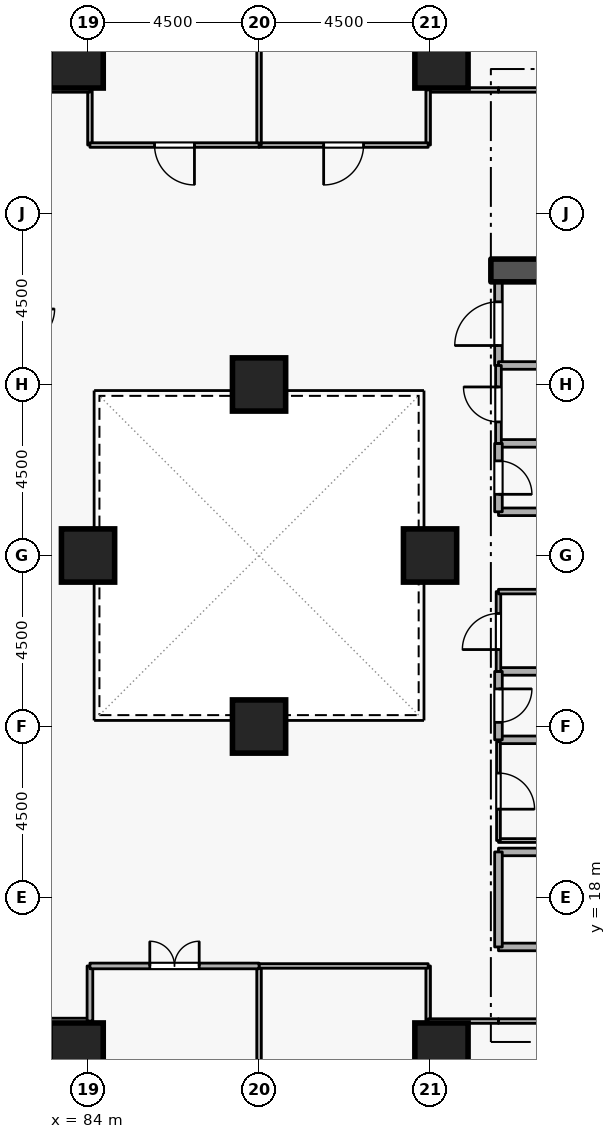
"""IFC4 building model, lengths in metres.
Left out: names, types, materials, properties, quantities, classifications, styles, units other than length and angle.
Written with IfcOpenShell. Run it as: python <this file> out.ifc"""

import sys

from ifc_helpers import new_model, si_unit, direction, frame, frame_2d, origin, origin_2d, place, context, subcontext, project, spatial, rectangle, extrude, element, fill, save


model = new_model("IFC4")
c1 = context("Model", 3, precision=1e-05, world=origin(), true_north=direction((0.0, 1.0)))
c2 = subcontext(c1, "Body", "Model", "MODEL_VIEW")
j1 = project(units=[si_unit("LENGTHUNIT", "METRE"), si_unit("PLANEANGLEUNIT", "RADIAN")], contexts=[c1])
p1 = place(None, origin())
s1 = spatial("IfcSite", under=j1, at=p1, CompositionType="ELEMENT")
p2 = place(p1, origin())
s2 = spatial("IfcBuilding", under=s1, at=p2, CompositionType="ELEMENT")
p3 = place(p2, frame((0.0, 0.0, 57.3)))
s3 = spatial("IfcBuildingStorey", under=s2, at=p3, CompositionType="ELEMENT", Elevation=57.3)
p4 = place(p3, frame((94.6, 34.5, 0.0), z_axis=(0.0, 0.0, 1.0), x_axis=(1.0, 0.0, 0.0)))
e1 = element("IfcWall", 1, at=p4, inside=s3, PredefinedType="SHEAR", context=c2, shape_type="SweptSolid", body=[
    extrude(rectangle(XDim=5.7, YDim=0.6, at=frame_2d((2.85, 0.0))), origin(), (0.0, 0.0, 1.0), 3.6),
])
for number, where, z_axis, x_axis in (
    (2, (93.3, 14.0, 0.0), (0.0, 0.0, 1.0), (1.0, 0.0, 0.0)),
    (3, (93.3, 40.0, 0.0), (0.0, 0.0, 1.0), (1.0, 0.0, 0.0)),
    (4, (83.7, 14.0, 0.0), (0.0, 0.0, 1.0), (1.0, 0.0, 0.0)),
    (5, (83.7, 40.0, 0.0), (0.0, 0.0, 1.0), (1.0, 0.0, 0.0)),
    (6, (93.0, 27.0, 0.0), (0.0, 0.0, 1.0), (1.0, 0.0, 0.0)),
    (7, (84.0, 27.0, 0.0), (0.0, 0.0, 1.0), (1.0, 0.0, 0.0)),
    (8, (88.5, 22.5, 0.0), (0.0, 0.0, 1.0), (1.0, 0.0, 0.0)),
    (9, (88.5, 31.5, 0.0), (0.0, 0.0, 1.0), (1.0, 0.0, 0.0)),
):
    element("IfcColumn", number, at=place(p3, frame(where, z_axis=z_axis, x_axis=x_axis)), inside=s3, PredefinedType="COLUMN", context=c2, shape_type="SweptSolid", body=[
        extrude(rectangle(XDim=1.4, YDim=1.4, at=origin_2d()), origin(), (0.0, 0.0, 1.0), 3.6),
    ])
p5 = place(p3, frame((94.8, 16.7, 0.0), z_axis=(0.0, 0.0, 1.0), x_axis=(1.0, 0.0, 0.0)))
e10 = element("IfcWall", 10, at=p5, inside=s3, PredefinedType="STANDARD", context=c2, shape_type="SweptSolid", body=[
    extrude(rectangle(XDim=5.7, YDim=0.2, at=frame_2d((2.85, 0.0))), origin(), (0.0, 0.0, 1.0), 3.34),
])
p6 = place(p5, frame((2.275, 0.0, 0.0)))
e11 = element("IfcOpeningElement", 11, at=p6, cuts=e10, PredefinedType="OPENING", context=c2, shape_type="SweptSolid", body=[
    extrude(rectangle(XDim=1.15, YDim=2.1, at=frame_2d((0.575, 1.05))), frame((0.0, 0.11, 0.0), z_axis=(0.0, -1.0, 0.0), x_axis=(1.0, 0.0, 0.0)), (0.0, 0.0, 1.0), 0.22),
])
p7 = place(p3, frame((97.1, 19.2, 0.0), z_axis=(0.0, 0.0, 1.0), x_axis=(-1.0, 0.0, 0.0)))
e12 = element("IfcWall", 12, at=p7, inside=s3, PredefinedType="STANDARD", context=c2, shape_type="SweptSolid", body=[
    extrude(rectangle(XDim=2.3, YDim=0.2, at=frame_2d((1.15, 0.0))), origin(), (0.0, 0.0, 1.0), 2.545),
])
p8 = place(p3, frame((94.8, 19.2, 0.0), z_axis=(0.0, 0.0, 1.0), x_axis=(0.0, -1.0, 0.0)))
e13 = element("IfcWall", 13, at=p8, inside=s3, PredefinedType="STANDARD", context=c2, shape_type="SweptSolid", body=[
    extrude(rectangle(XDim=2.5, YDim=0.2, at=frame_2d((1.25, 0.0))), origin(), (0.0, 0.0, 1.0), 3.34),
])
for number, where, z_axis, x_axis in (
    (14, (94.8, 28.15, 0.0), (0.0, 0.0, 1.0), (1.0, 0.0, 0.0)),
    (15, (96.85, 29.95, 0.0), (0.0, 0.0, 1.0), (-1.0, 0.0, 0.0)),
):
    element("IfcWall", number, at=place(p3, frame(where, z_axis=z_axis, x_axis=x_axis)), inside=s3, PredefinedType="STANDARD", context=c2, shape_type="SweptSolid", body=[
        extrude(rectangle(XDim=2.05, YDim=0.2, at=frame_2d((1.025, 0.0))), origin(), (0.0, 0.0, 1.0), 3.34),
    ])
p9 = place(p3, frame((94.8, 29.95, 0.0), z_axis=(0.0, 0.0, 1.0), x_axis=(0.0, -1.0, 0.0)))
e16 = element("IfcWall", 16, at=p9, inside=s3, PredefinedType="STANDARD", context=c2, shape_type="SweptSolid", body=[
    extrude(rectangle(XDim=1.8, YDim=0.2, at=frame_2d((0.9, 0.0))), origin(), (0.0, 0.0, 1.0), 3.34),
])
p10 = place(p9, frame((0.46, 0.0, 0.0)))
e17 = element("IfcOpeningElement", 17, at=p10, cuts=e16, PredefinedType="OPENING", context=c2, shape_type="SweptSolid", body=[
    extrude(rectangle(XDim=0.88, YDim=2.04, at=frame_2d((0.44, 1.02))), frame((0.0, 0.11, 0.0), z_axis=(0.0, -1.0, 0.0), x_axis=(1.0, 0.0, 0.0)), (0.0, 0.0, 1.0), 0.22),
])
for number, where, z_axis, x_axis in (
    (18, (94.8, 22.15, 0.0), (0.0, 0.0, 1.0), (1.0, 0.0, 0.0)),
    (19, (96.85, 23.95, 0.0), (0.0, 0.0, 1.0), (-1.0, 0.0, 0.0)),
):
    element("IfcWall", number, at=place(p3, frame(where, z_axis=z_axis, x_axis=x_axis)), inside=s3, PredefinedType="STANDARD", context=c2, shape_type="SweptSolid", body=[
        extrude(rectangle(XDim=2.05, YDim=0.2, at=frame_2d((1.025, 0.0))), origin(), (0.0, 0.0, 1.0), 3.34),
    ])
p11 = place(p3, frame((94.8, 23.95, 0.0), z_axis=(0.0, 0.0, 1.0), x_axis=(0.0, -1.0, 0.0)))
e20 = element("IfcWall", 20, at=p11, inside=s3, PredefinedType="STANDARD", context=c2, shape_type="SweptSolid", body=[
    extrude(rectangle(XDim=1.8, YDim=0.2, at=frame_2d((0.9, 0.0))), origin(), (0.0, 0.0, 1.0), 3.34),
])
p12 = place(p11, frame((0.46, 0.0, 0.0)))
e21 = element("IfcOpeningElement", 21, at=p12, cuts=e20, PredefinedType="OPENING", context=c2, shape_type="SweptSolid", body=[
    extrude(rectangle(XDim=0.88, YDim=2.04, at=frame_2d((0.44, 1.02))), frame((0.0, 0.11, 0.0), z_axis=(0.0, -1.0, 0.0), x_axis=(1.0, 0.0, 0.0)), (0.0, 0.0, 1.0), 0.22),
])
p13 = place(p3, frame((94.8, 32.0, 0.0), z_axis=(0.0, 0.0, 1.0), x_axis=(0.0, 1.0, 0.0)))
e22 = element("IfcWall", 22, at=p13, inside=s3, PredefinedType="STANDARD", context=c2, shape_type="SweptSolid", body=[
    extrude(rectangle(XDim=2.2, YDim=0.2, at=frame_2d((1.1, 0.0))), origin(), (0.0, 0.0, 1.0), 3.34),
])
p14 = place(p13, frame((0.525, 0.0, 0.0)))
e23 = element("IfcOpeningElement", 23, at=p14, cuts=e22, PredefinedType="OPENING", context=c2, shape_type="SweptSolid", body=[
    extrude(rectangle(XDim=1.15, YDim=2.1, at=frame_2d((0.575, 1.05))), frame((0.0, 0.11, 0.0), z_axis=(0.0, -1.0, 0.0), x_axis=(1.0, 0.0, 0.0)), (0.0, 0.0, 1.0), 0.22),
])
p15 = place(p3, frame((96.85, 32.0, 0.0), z_axis=(0.0, 0.0, 1.0), x_axis=(-1.0, 0.0, 0.0)))
e24 = element("IfcWall", 24, at=p15, inside=s3, PredefinedType="STANDARD", context=c2, shape_type="SweptSolid", body=[
    extrude(rectangle(XDim=2.05, YDim=0.2, at=frame_2d((1.025, 0.0))), origin(), (0.0, 0.0, 1.0), 3.34),
])
p16 = place(p3, frame((94.8, 19.5, 0.0), z_axis=(0.0, 0.0, 1.0), x_axis=(1.0, 0.0, 0.0)))
e25 = element("IfcWall", 25, at=p16, inside=s3, PredefinedType="PARTITIONING", context=c2, shape_type="SweptSolid", body=[
    extrude(rectangle(XDim=2.05, YDim=0.1, at=frame_2d((1.025, 0.0))), origin(), (0.0, 0.0, 1.0), 2.545),
])
p17 = place(p3, frame((94.8, 22.1, 0.0), z_axis=(0.0, 0.0, 1.0), x_axis=(0.0, -1.0, 0.0)))
e26 = element("IfcWall", 26, at=p17, inside=s3, PredefinedType="PARTITIONING", context=c2, shape_type="SweptSolid", body=[
    extrude(rectangle(XDim=2.6, YDim=0.1, at=frame_2d((1.3, 0.0))), origin(), (0.0, 0.0, 1.0), 3.34),
])
p18 = place(p17, frame((0.825, 0.0, 0.0)))
e27 = element("IfcOpeningElement", 27, at=p18, cuts=e26, PredefinedType="OPENING", context=c2, shape_type="SweptSolid", body=[
    extrude(rectangle(XDim=0.95, YDim=2.1, at=frame_2d((0.475, 1.05))), frame((0.0, 0.06, 0.0), z_axis=(0.0, -1.0, 0.0), x_axis=(1.0, 0.0, 0.0)), (0.0, 0.0, 1.0), 0.12),
])
p19 = place(p3, frame((94.8, 23.95, 0.0), z_axis=(0.0, 0.0, 1.0), x_axis=(0.0, 1.0, 0.0)))
e28 = element("IfcWall", 28, at=p19, inside=s3, PredefinedType="PARTITIONING", context=c2, shape_type="SweptSolid", body=[
    extrude(rectangle(XDim=2.1, YDim=0.12, at=frame_2d((1.05, 0.0))), origin(), (0.0, 0.0, 1.0), 3.34),
])
p20 = place(p19, frame((0.575, 0.0, 0.0)))
e29 = element("IfcOpeningElement", 29, at=p20, cuts=e28, PredefinedType="OPENING", context=c2, shape_type="SweptSolid", body=[
    extrude(rectangle(XDim=0.95, YDim=2.1, at=frame_2d((0.475, 1.05))), frame((0.0, 0.07, 0.0), z_axis=(0.0, -1.0, 0.0), x_axis=(1.0, 0.0, 0.0)), (0.0, 0.0, 1.0), 0.14),
])
p21 = place(p3, frame((94.8, 26.05, 0.0), z_axis=(0.0, 0.0, 1.0), x_axis=(1.0, 0.0, 0.0)))
e30 = element("IfcWall", 30, at=p21, inside=s3, PredefinedType="PARTITIONING", context=c2, shape_type="SweptSolid", body=[
    extrude(rectangle(XDim=2.05, YDim=0.12, at=frame_2d((1.025, 0.0))), origin(), (0.0, 0.0, 1.0), 3.34),
])
p22 = place(p3, frame((94.8, 29.95, 0.0), z_axis=(0.0, 0.0, 1.0), x_axis=(0.0, 1.0, 0.0)))
e31 = element("IfcWall", 31, at=p22, inside=s3, PredefinedType="PARTITIONING", context=c2, shape_type="SweptSolid", body=[
    extrude(rectangle(XDim=2.05, YDim=0.15, at=frame_2d((1.025, 0.0))), origin(), (0.0, 0.0, 1.0), 3.34),
])
p23 = place(p22, frame((0.565, 0.0, 0.0)))
e32 = element("IfcOpeningElement", 32, at=p23, cuts=e31, PredefinedType="OPENING", context=c2, shape_type="SweptSolid", body=[
    extrude(rectangle(XDim=0.92, YDim=2.08, at=frame_2d((0.46, 1.04))), frame((0.0, 0.085, 0.0), z_axis=(0.0, -1.0, 0.0), x_axis=(1.0, 0.0, 0.0)), (0.0, 0.0, 1.0), 0.17),
])
p24 = place(p3, frame((92.95, 16.2, 0.0), z_axis=(0.0, 0.0, 1.0), x_axis=(0.0, -1.0, 0.0)))
e33 = element("IfcWall", 33, at=p24, inside=s3, PredefinedType="PARTITIONING", context=c2, shape_type="SweptSolid", body=[
    extrude(rectangle(XDim=1.45, YDim=0.12, at=frame_2d((0.725, 0.0))), origin(), (0.0, 0.0, 1.0), 3.34),
])
p25 = place(p3, frame((92.95, 14.75, 0.0), z_axis=(0.0, 0.0, 1.0), x_axis=(1.0, 0.0, 0.0)))
e34 = element("IfcWall", 34, at=p25, inside=s3, PredefinedType="PARTITIONING", context=c2, shape_type="SweptSolid", body=[
    extrude(rectangle(XDim=1.85, YDim=0.12, at=frame_2d((0.925, 0.0))), origin(), (0.0, 0.0, 1.0), 3.34),
])
p26 = place(p3, frame((94.8, 14.75, 0.0), z_axis=(0.0, 0.0, 1.0), x_axis=(1.0, 0.0, 0.0)))
e35 = element("IfcWall", 35, at=p26, inside=s3, PredefinedType="PARTITIONING", context=c2, shape_type="SweptSolid", body=[
    extrude(rectangle(XDim=9.35, YDim=0.12, at=frame_2d((4.675, 0.0))), origin(), (0.0, 0.0, 1.0), 3.34),
])
p27 = place(p26, frame((4.15, 0.0, 0.0)))
e36 = element("IfcOpeningElement", 36, at=p27, cuts=e35, PredefinedType="OPENING", context=c2, shape_type="SweptSolid", body=[
    extrude(rectangle(XDim=1.05, YDim=2.1, at=frame_2d((0.525, 1.05))), frame((0.0, 0.07, 0.0), z_axis=(0.0, -1.0, 0.0), x_axis=(1.0, 0.0, 0.0)), (0.0, 0.0, 1.0), 0.14),
])
p28 = place(p3, frame((88.5, 8.78, 0.0), z_axis=(0.0, 0.0, 1.0), x_axis=(0.0, 1.0, 0.0)))
e37 = element("IfcWall", 37, at=p28, inside=s3, PredefinedType="PARTITIONING", context=c2, shape_type="SweptSolid", body=[
    extrude(rectangle(XDim=7.42, YDim=0.12, at=frame_2d((3.71, 0.0))), origin(), (0.0, 0.0, 1.0), 2.932),
])
p29 = place(p3, frame((88.5, 16.2, 0.0), z_axis=(0.0, 0.0, 1.0), x_axis=(1.0, 0.0, 0.0)))
e38 = element("IfcWall", 38, at=p29, inside=s3, PredefinedType="PARTITIONING", context=c2, shape_type="SweptSolid", body=[
    extrude(rectangle(XDim=4.45, YDim=0.12, at=frame_2d((2.225, 0.0))), origin(), (0.0, 0.0, 1.0), 3.34),
])
p30 = place(p3, frame((82.2, 14.75, 0.0), z_axis=(0.0, 0.0, 1.0), x_axis=(1.0, 0.0, 0.0)))
e39 = element("IfcWall", 39, at=p30, inside=s3, PredefinedType="PARTITIONING", context=c2, shape_type="SweptSolid", body=[
    extrude(rectangle(XDim=1.85, YDim=0.15, at=frame_2d((0.925, 0.0))), origin(), (0.0, 0.0, 1.0), 3.34),
])
p31 = place(p3, frame((84.05, 14.75, 0.0), z_axis=(0.0, 0.0, 1.0), x_axis=(0.0, 1.0, 0.0)))
e40 = element("IfcWall", 40, at=p31, inside=s3, PredefinedType="PARTITIONING", context=c2, shape_type="SweptSolid", body=[
    extrude(rectangle(XDim=1.45, YDim=0.15, at=frame_2d((0.725, 0.0))), origin(), (0.0, 0.0, 1.0), 3.34),
])
p32 = place(p3, frame((84.05, 16.2, 0.0), z_axis=(0.0, 0.0, 1.0), x_axis=(1.0, 0.0, 0.0)))
e41 = element("IfcWall", 41, at=p32, inside=s3, PredefinedType="PARTITIONING", context=c2, shape_type="SweptSolid", body=[
    extrude(rectangle(XDim=4.45, YDim=0.15, at=frame_2d((2.225, 0.0))), origin(), (0.0, 0.0, 1.0), 3.34),
])
p33 = place(p32, frame((1.575, 0.0, 0.0)))
e42 = element("IfcOpeningElement", 42, at=p33, cuts=e41, PredefinedType="OPENING", context=c2, shape_type="SweptSolid", body=[
    extrude(rectangle(XDim=1.3, YDim=2.12, at=frame_2d((0.65, 1.06))), frame((0.0, 0.085, 0.0), z_axis=(0.0, -1.0, 0.0), x_axis=(1.0, 0.0, 0.0)), (0.0, 0.0, 1.0), 0.17),
])
p34 = place(p3, frame((97.95, 39.25, 0.0), z_axis=(0.0, 0.0, 1.0), x_axis=(-1.0, 0.0, 0.0)))
e43 = element("IfcWall", 43, at=p34, inside=s3, PredefinedType="PARTITIONING", context=c2, shape_type="SweptSolid", body=[
    extrude(rectangle(XDim=3.15, YDim=0.12, at=frame_2d((1.575, 0.0))), origin(), (0.0, 0.0, 1.0), 3.34),
])
p35 = place(p3, frame((94.8, 39.25, 0.0), z_axis=(0.0, 0.0, 1.0), x_axis=(-1.0, 0.0, 0.0)))
e44 = element("IfcWall", 44, at=p35, inside=s3, PredefinedType="PARTITIONING", context=c2, shape_type="SweptSolid", body=[
    extrude(rectangle(XDim=1.85, YDim=0.12, at=frame_2d((0.925, 0.0))), origin(), (0.0, 0.0, 1.0), 3.34),
])
p36 = place(p3, frame((92.95, 39.25, 0.0), z_axis=(0.0, 0.0, 1.0), x_axis=(0.0, -1.0, 0.0)))
e45 = element("IfcWall", 45, at=p36, inside=s3, PredefinedType="PARTITIONING", context=c2, shape_type="SweptSolid", body=[
    extrude(rectangle(XDim=1.45, YDim=0.12, at=frame_2d((0.725, 0.0))), origin(), (0.0, 0.0, 1.0), 3.34),
])
p37 = place(p3, frame((92.95, 37.8, 0.0), z_axis=(0.0, 0.0, 1.0), x_axis=(-1.0, 0.0, 0.0)))
e46 = element("IfcWall", 46, at=p37, inside=s3, PredefinedType="PARTITIONING", context=c2, shape_type="SweptSolid", body=[
    extrude(rectangle(XDim=4.45, YDim=0.12, at=frame_2d((2.225, 0.0))), origin(), (0.0, 0.0, 1.0), 3.34),
])
p38 = place(p37, frame((1.7, 0.0, 0.0)))
e47 = element("IfcOpeningElement", 47, at=p38, cuts=e46, PredefinedType="OPENING", context=c2, shape_type="SweptSolid", body=[
    extrude(rectangle(XDim=1.05, YDim=2.1, at=frame_2d((0.525, 1.05))), frame((0.0, 0.07, 0.0), z_axis=(0.0, -1.0, 0.0), x_axis=(1.0, 0.0, 0.0)), (0.0, 0.0, 1.0), 0.14),
])
p39 = place(p3, frame((88.5, 37.8, 0.0), z_axis=(0.0, 0.0, 1.0), x_axis=(0.0, 1.0, 0.0)))
e48 = element("IfcWall", 48, at=p39, inside=s3, PredefinedType="PARTITIONING", context=c2, shape_type="SweptSolid", body=[
    extrude(rectangle(XDim=13.42, YDim=0.12, at=frame_2d((6.71, 0.0))), origin(), (0.0, 0.0, 1.0), 2.932),
])
p40 = place(p3, frame((84.05, 37.8, 0.0), z_axis=(0.0, 0.0, 1.0), x_axis=(0.0, 1.0, 0.0)))
e49 = element("IfcWall", 49, at=p40, inside=s3, PredefinedType="PARTITIONING", context=c2, shape_type="SweptSolid", body=[
    extrude(rectangle(XDim=1.45, YDim=0.12, at=frame_2d((0.725, 0.0))), origin(), (0.0, 0.0, 1.0), 3.34),
])
p41 = place(p3, frame((84.05, 39.25, 0.0), z_axis=(0.0, 0.0, 1.0), x_axis=(-1.0, 0.0, 0.0)))
e50 = element("IfcWall", 50, at=p41, inside=s3, PredefinedType="PARTITIONING", context=c2, shape_type="SweptSolid", body=[
    extrude(rectangle(XDim=1.85, YDim=0.12, at=frame_2d((0.925, 0.0))), origin(), (0.0, 0.0, 1.0), 3.34),
])
p42 = place(p3, frame((88.5, 37.8, 0.0), z_axis=(0.0, 0.0, 1.0), x_axis=(-1.0, 0.0, 0.0)))
e51 = element("IfcWall", 51, at=p42, inside=s3, PredefinedType="PARTITIONING", context=c2, shape_type="SweptSolid", body=[
    extrude(rectangle(XDim=4.45, YDim=0.12, at=frame_2d((2.225, 0.0))), origin(), (0.0, 0.0, 1.0), 3.34),
])
p43 = place(p42, frame((1.7, 0.0, 0.0)))
e52 = element("IfcOpeningElement", 52, at=p43, cuts=e51, PredefinedType="OPENING", context=c2, shape_type="SweptSolid", body=[
    extrude(rectangle(XDim=1.05, YDim=2.1, at=frame_2d((0.525, 1.05))), frame((0.0, 0.07, 0.0), z_axis=(0.0, -1.0, 0.0), x_axis=(1.0, 0.0, 0.0)), (0.0, 0.0, 1.0), 0.14),
])
p44 = place(p10, origin())
e53 = element("IfcDoor", 53, at=p44, inside=s3, OperationType="SINGLE_SWING_RIGHT", PredefinedType="DOOR", context=c2, shape_type="SweptSolid", body=[
    extrude(rectangle(XDim=0.88, YDim=2.04, at=frame_2d((0.44, 1.02))), frame((0.0, 0.025, 0.0), z_axis=(0.0, -1.0, 0.0), x_axis=(1.0, 0.0, 0.0)), (0.0, 0.0, 1.0), 0.05),
])
fill(e17, e53)
p45 = place(p12, origin())
e54 = element("IfcDoor", 54, at=p45, inside=s3, OperationType="SINGLE_SWING_LEFT", PredefinedType="DOOR", context=c2, shape_type="SweptSolid", body=[
    extrude(rectangle(XDim=0.88, YDim=2.04, at=frame_2d((0.44, 1.02))), frame((0.0, 0.025, 0.0), z_axis=(0.0, -1.0, 0.0), x_axis=(1.0, 0.0, 0.0)), (0.0, 0.0, 1.0), 0.05),
])
fill(e21, e54)
p46 = place(p18, origin())
e55 = element("IfcDoor", 55, at=p46, inside=s3, OperationType="SINGLE_SWING_RIGHT", PredefinedType="DOOR", context=c2, shape_type="SweptSolid", body=[
    extrude(rectangle(XDim=0.95, YDim=2.1, at=frame_2d((0.475, 1.05))), frame((0.0, 0.025, 0.0), z_axis=(0.0, -1.0, 0.0), x_axis=(1.0, 0.0, 0.0)), (0.0, 0.0, 1.0), 0.05),
])
fill(e27, e55)
p47 = place(p20, origin())
e56 = element("IfcDoor", 56, at=p47, inside=s3, OperationType="SINGLE_SWING_LEFT", PredefinedType="DOOR", context=c2, shape_type="SweptSolid", body=[
    extrude(rectangle(XDim=0.95, YDim=2.1, at=frame_2d((0.475, 1.05))), frame((0.0, 0.025, 0.0), z_axis=(0.0, -1.0, 0.0), x_axis=(1.0, 0.0, 0.0)), (0.0, 0.0, 1.0), 0.05),
])
fill(e29, e56)
p48 = place(p23, origin())
e57 = element("IfcDoor", 57, at=p48, inside=s3, OperationType="SINGLE_SWING_RIGHT", PredefinedType="DOOR", context=c2, shape_type="SweptSolid", body=[
    extrude(rectangle(XDim=0.92, YDim=2.08, at=frame_2d((0.46, 1.04))), frame((0.0, 0.025, 0.0), z_axis=(0.0, -1.0, 0.0), x_axis=(1.0, 0.0, 0.0)), (0.0, 0.0, 1.0), 0.05),
])
fill(e32, e57)
p49 = place(p14, origin())
e58 = element("IfcDoor", 58, at=p49, inside=s3, OperationType="SINGLE_SWING_LEFT", PredefinedType="DOOR", context=c2, shape_type="SweptSolid", body=[
    extrude(rectangle(XDim=1.15, YDim=2.1, at=frame_2d((0.575, 1.05))), frame((0.0, 0.025, 0.0), z_axis=(0.0, -1.0, 0.0), x_axis=(1.0, 0.0, 0.0)), (0.0, 0.0, 1.0), 0.05),
])
fill(e23, e58)
p50 = place(p33, origin())
e59 = element("IfcDoor", 59, at=p50, inside=s3, OperationType="DOUBLE_DOOR_SINGLE_SWING", PredefinedType="DOOR", context=c2, shape_type="SweptSolid", body=[
    extrude(rectangle(XDim=1.3, YDim=2.12, at=frame_2d((0.65, 1.06))), frame((0.0, 0.025, 0.0), z_axis=(0.0, -1.0, 0.0), x_axis=(1.0, 0.0, 0.0)), (0.0, 0.0, 1.0), 0.05),
])
fill(e42, e59)
p51 = place(p38, origin())
e60 = element("IfcDoor", 60, at=p51, inside=s3, OperationType="SINGLE_SWING_RIGHT", PredefinedType="DOOR", context=c2, shape_type="SweptSolid", body=[
    extrude(rectangle(XDim=1.05, YDim=2.1, at=frame_2d((0.525, 1.05))), frame((0.0, 0.025, 0.0), z_axis=(0.0, -1.0, 0.0), x_axis=(1.0, 0.0, 0.0)), (0.0, 0.0, 1.0), 0.05),
])
fill(e47, e60)
p52 = place(p43, origin())
e61 = element("IfcDoor", 61, at=p52, inside=s3, OperationType="SINGLE_SWING_LEFT", PredefinedType="DOOR", context=c2, shape_type="SweptSolid", body=[
    extrude(rectangle(XDim=1.05, YDim=2.1, at=frame_2d((0.525, 1.05))), frame((0.0, 0.025, 0.0), z_axis=(0.0, -1.0, 0.0), x_axis=(1.0, 0.0, 0.0)), (0.0, 0.0, 1.0), 0.05),
])
fill(e52, e61)
save(model, sys.argv[1])
